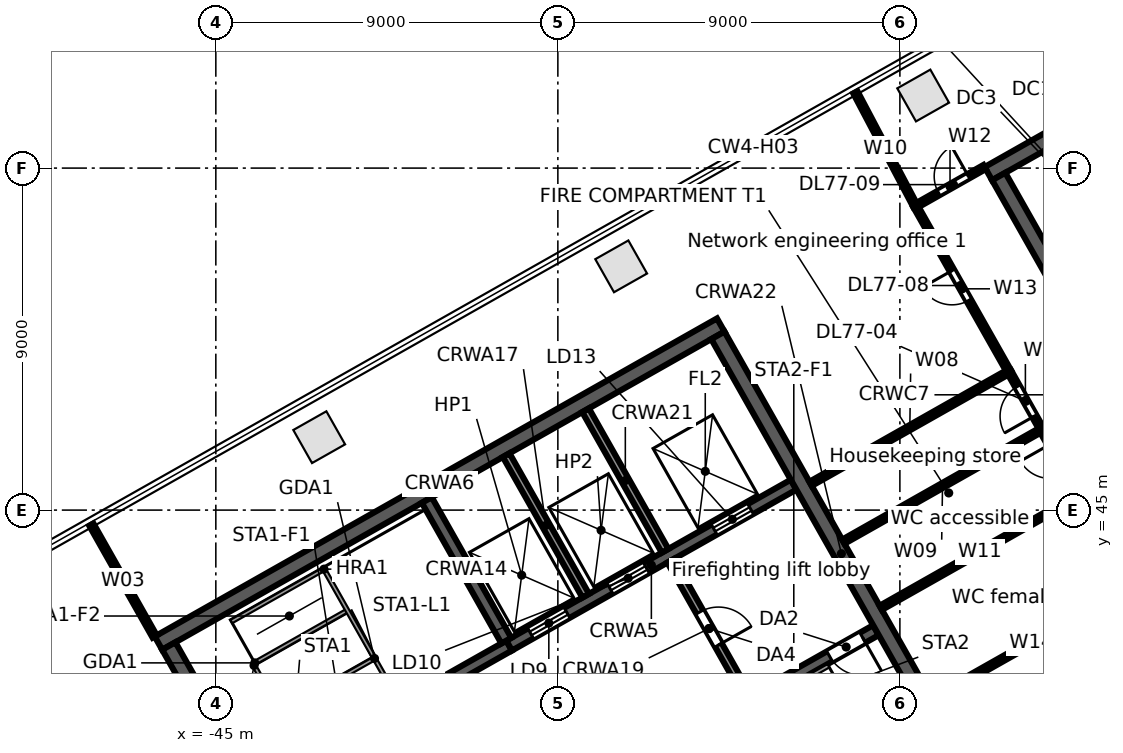
"""IFC4 building model, lengths in metres.
Left out: names, types, materials, properties, quantities, classifications, styles, units other than length and angle.
Written with IfcOpenShell. Run it as: python <this file> out.ifc"""

import sys

from ifc_helpers import new_model, si_unit, direction, frame, frame_2d, origin, origin_2d, place, context, subcontext, project, spatial, rectangle, extrude, element, fill, save


model = new_model("IFC4")
c1 = context("Model", 3, precision=1e-05, world=origin(), true_north=direction((0.0, 1.0)))
c2 = subcontext(c1, "Body", "Model", "MODEL_VIEW")
j1 = project(units=[si_unit("LENGTHUNIT", "METRE"), si_unit("PLANEANGLEUNIT", "RADIAN")], contexts=[c1])
p1 = place(None, origin())
s1 = spatial("IfcSite", under=j1, at=p1, CompositionType="ELEMENT")
p2 = place(p1, origin())
s2 = spatial("IfcBuilding", under=s1, at=p2, CompositionType="ELEMENT")
p3 = place(p2, frame((0.0, 0.0, 339.3)))
s3 = spatial("IfcBuildingStorey", under=s2, at=p3, CompositionType="ELEMENT", Elevation=339.3)
for number, where, z_axis, x_axis in (
    (1, (-26.388, 55.91, 0.0), (0.0, 0.0, 1.0), (-0.87, -0.492, 0.0)),
    (2, (-34.334, 51.414, 0.0), (0.0, 0.0, 1.0), (-0.87, -0.492, 0.0)),
    (3, (-42.28, 46.919, 0.0), (0.0, 0.0, 1.0), (-0.87, -0.492, 0.0)),
):
    element("IfcColumn", number, at=place(p3, frame(where, z_axis=z_axis, x_axis=x_axis)), inside=s3, PredefinedType="COLUMN", context=c2, shape_type="SweptSolid", body=[
        extrude(rectangle(XDim=1.0, YDim=1.0, at=origin_2d()), origin(), (0.0, 0.0, 1.0), 3.8),
    ])
p4 = place(p3, frame((-3.017, 46.293, 0.0), z_axis=(0.0, 0.0, 1.0), x_axis=(-0.870355474887, -0.492423950812, 0.0)))
e4 = element("IfcWall", 4, at=p4, inside=s3, PredefinedType="STANDARD", context=c2, shape_type="SweptSolid", body=[
    extrude(rectangle(XDim=40.34, YDim=0.25, at=frame_2d((20.17, 0.0))), origin(), (0.0, 0.0, 1.0), 3.52),
])
p5 = place(p4, frame((37.428, 0.0, 0.8)))
e5 = element("IfcOpeningElement", 5, at=p5, cuts=e4, PredefinedType="OPENING", context=c2, shape_type="SweptSolid", body=[
    extrude(rectangle(XDim=2.4, YDim=2.2, at=frame_2d((1.2, 1.1))), frame((0.0, 0.135, 0.0), z_axis=(0.0, -1.0, 0.0), x_axis=(1.0, 0.0, 0.0)), (0.0, 0.0, 1.0), 0.27),
])
p6 = place(p4, frame((34.372, 0.0, 0.0)))
e6 = element("IfcOpeningElement", 6, at=p6, cuts=e4, PredefinedType="OPENING", context=c2, shape_type="SweptSolid", body=[
    extrude(rectangle(XDim=1.8, YDim=2.4, at=frame_2d((0.9, 1.2))), frame((0.0, 0.135, 0.0), z_axis=(0.0, -1.0, 0.0), x_axis=(1.0, 0.0, 0.0)), (0.0, 0.0, 1.0), 0.27),
])
p7 = place(p4, frame((30.716, 0.0, 0.8)))
e7 = element("IfcOpeningElement", 7, at=p7, cuts=e4, PredefinedType="OPENING", context=c2, shape_type="SweptSolid", body=[
    extrude(rectangle(XDim=2.4, YDim=2.2, at=frame_2d((1.2, 1.1))), frame((0.0, 0.135, 0.0), z_axis=(0.0, -1.0, 0.0), x_axis=(1.0, 0.0, 0.0)), (0.0, 0.0, 1.0), 0.27),
])
p8 = place(p4, frame((27.36, 0.0, 0.8)))
e8 = element("IfcOpeningElement", 8, at=p8, cuts=e4, PredefinedType="OPENING", context=c2, shape_type="SweptSolid", body=[
    extrude(rectangle(XDim=2.4, YDim=2.2, at=frame_2d((1.2, 1.1))), frame((0.0, 0.135, 0.0), z_axis=(0.0, -1.0, 0.0), x_axis=(1.0, 0.0, 0.0)), (0.0, 0.0, 1.0), 0.27),
])
p9 = place(p4, frame((24.304, 0.0, 0.0)))
e9 = element("IfcOpeningElement", 9, at=p9, cuts=e4, PredefinedType="OPENING", context=c2, shape_type="SweptSolid", body=[
    extrude(rectangle(XDim=1.8, YDim=2.4, at=frame_2d((0.9, 1.2))), frame((0.0, 0.135, 0.0), z_axis=(0.0, -1.0, 0.0), x_axis=(1.0, 0.0, 0.0)), (0.0, 0.0, 1.0), 0.27),
])
p10 = place(p4, frame((20.648, 0.0, 0.8)))
e10 = element("IfcOpeningElement", 10, at=p10, cuts=e4, PredefinedType="OPENING", context=c2, shape_type="SweptSolid", body=[
    extrude(rectangle(XDim=2.4, YDim=2.2, at=frame_2d((1.2, 1.1))), frame((0.0, 0.135, 0.0), z_axis=(0.0, -1.0, 0.0), x_axis=(1.0, 0.0, 0.0)), (0.0, 0.0, 1.0), 0.27),
])
p11 = place(p4, frame((17.292, 0.0, 0.8)))
e11 = element("IfcOpeningElement", 11, at=p11, cuts=e4, PredefinedType="OPENING", context=c2, shape_type="SweptSolid", body=[
    extrude(rectangle(XDim=2.4, YDim=2.2, at=frame_2d((1.2, 1.1))), frame((0.0, 0.135, 0.0), z_axis=(0.0, -1.0, 0.0), x_axis=(1.0, 0.0, 0.0)), (0.0, 0.0, 1.0), 0.27),
])
p12 = place(p4, frame((14.236, 0.0, 0.0)))
e12 = element("IfcOpeningElement", 12, at=p12, cuts=e4, PredefinedType="OPENING", context=c2, shape_type="SweptSolid", body=[
    extrude(rectangle(XDim=1.8, YDim=2.4, at=frame_2d((0.9, 1.2))), frame((0.0, 0.135, 0.0), z_axis=(0.0, -1.0, 0.0), x_axis=(1.0, 0.0, 0.0)), (0.0, 0.0, 1.0), 0.27),
])
p13 = place(p4, frame((10.58, 0.0, 0.8)))
e13 = element("IfcOpeningElement", 13, at=p13, cuts=e4, PredefinedType="OPENING", context=c2, shape_type="SweptSolid", body=[
    extrude(rectangle(XDim=2.4, YDim=2.2, at=frame_2d((1.2, 1.1))), frame((0.0, 0.135, 0.0), z_axis=(0.0, -1.0, 0.0), x_axis=(1.0, 0.0, 0.0)), (0.0, 0.0, 1.0), 0.27),
])
p14 = place(p4, frame((7.224, 0.0, 0.8)))
e14 = element("IfcOpeningElement", 14, at=p14, cuts=e4, PredefinedType="OPENING", context=c2, shape_type="SweptSolid", body=[
    extrude(rectangle(XDim=2.4, YDim=2.2, at=frame_2d((1.2, 1.1))), frame((0.0, 0.135, 0.0), z_axis=(0.0, -1.0, 0.0), x_axis=(1.0, 0.0, 0.0)), (0.0, 0.0, 1.0), 0.27),
])
p15 = place(p4, frame((4.168, 0.0, 0.0)))
e15 = element("IfcOpeningElement", 15, at=p15, cuts=e4, PredefinedType="OPENING", context=c2, shape_type="SweptSolid", body=[
    extrude(rectangle(XDim=1.8, YDim=2.4, at=frame_2d((0.9, 1.2))), frame((0.0, 0.135, 0.0), z_axis=(0.0, -1.0, 0.0), x_axis=(1.0, 0.0, 0.0)), (0.0, 0.0, 1.0), 0.27),
])
p16 = place(p4, frame((0.512, 0.0, 0.8)))
e16 = element("IfcOpeningElement", 16, at=p16, cuts=e4, PredefinedType="OPENING", context=c2, shape_type="SweptSolid", body=[
    extrude(rectangle(XDim=2.4, YDim=2.2, at=frame_2d((1.2, 1.1))), frame((0.0, 0.135, 0.0), z_axis=(0.0, -1.0, 0.0), x_axis=(1.0, 0.0, 0.0)), (0.0, 0.0, 1.0), 0.27),
])
p17 = place(p3, frame((-34.245, 38.097, 0.0), z_axis=(0.0, 0.0, 1.0), x_axis=(0.870356351998, 0.492422400523, 0.0)))
e17 = element("IfcWall", 17, at=p17, inside=s3, PredefinedType="SOLIDWALL", context=c2, shape_type="SweptSolid", body=[
    extrude(rectangle(XDim=7.6, YDim=0.3, at=frame_2d((3.8, 0.0))), origin(), (0.0, 0.0, 1.0), 3.52),
])
p18 = place(p17, frame((6.2, 0.0, 0.0)))
e18 = element("IfcOpeningElement", 18, at=p18, cuts=e17, PredefinedType="OPENING", context=c2, shape_type="SweptSolid", body=[
    extrude(rectangle(XDim=1.0, YDim=2.1, at=frame_2d((0.5, 1.05))), frame((0.0, 0.16, 0.0), z_axis=(0.0, -1.0, 0.0), x_axis=(1.0, 0.0, 0.0)), (0.0, 0.0, 1.0), 0.32),
])
p19 = place(p3, frame((-43.897, 37.692, 0.0), z_axis=(0.0, 0.0, 1.0), x_axis=(0.870356351998, 0.492422400523, 0.0)))
e19 = element("IfcWall", 19, at=p19, inside=s3, PredefinedType="SOLIDWALL", context=c2, shape_type="SweptSolid", body=[
    extrude(rectangle(XDim=7.6, YDim=0.3, at=frame_2d((3.8, 0.0))), origin(), (0.0, 0.0, 1.0), 3.52),
])
p20 = place(p19, frame((0.4, 0.0, 0.0)))
e20 = element("IfcOpeningElement", 20, at=p20, cuts=e19, PredefinedType="OPENING", context=c2, shape_type="SweptSolid", body=[
    extrude(rectangle(XDim=1.0, YDim=2.1, at=frame_2d((0.5, 1.05))), frame((0.0, 0.16, 0.0), z_axis=(0.0, -1.0, 0.0), x_axis=(1.0, 0.0, 0.0)), (0.0, 0.0, 1.0), 0.32),
])
p21 = place(p3, frame((-37.282, 41.435, 0.0), z_axis=(0.0, 0.0, 1.0), x_axis=(0.870361315115, 0.492413628113, 0.0)))
e21 = element("IfcWall", 21, at=p21, inside=s3, PredefinedType="SOLIDWALL", context=c2, shape_type="SweptSolid", body=[
    extrude(rectangle(XDim=8.6, YDim=0.3, at=frame_2d((4.3, 0.0))), origin(), (0.0, 0.0, 1.0), 3.52),
])
p22 = place(p21, frame((0.65, 0.0, 0.0)))
e22 = element("IfcOpeningElement", 22, at=p22, cuts=e21, PredefinedType="OPENING", context=c2, shape_type="SweptSolid", body=[
    extrude(rectangle(XDim=1.1, YDim=2.1, at=frame_2d((0.55, 1.05))), frame((0.0, 0.16, 0.0), z_axis=(0.0, -1.0, 0.0), x_axis=(1.0, 0.0, 0.0)), (0.0, 0.0, 1.0), 0.32),
])
p23 = place(p21, frame((3.05, 0.0, 0.0)))
e23 = element("IfcOpeningElement", 23, at=p23, cuts=e21, PredefinedType="OPENING", context=c2, shape_type="SweptSolid", body=[
    extrude(rectangle(XDim=1.1, YDim=2.1, at=frame_2d((0.55, 1.05))), frame((0.0, 0.16, 0.0), z_axis=(0.0, -1.0, 0.0), x_axis=(1.0, 0.0, 0.0)), (0.0, 0.0, 1.0), 0.32),
])
p24 = place(p21, frame((6.2, 0.0, 0.0)))
e24 = element("IfcOpeningElement", 24, at=p24, cuts=e21, PredefinedType="OPENING", context=c2, shape_type="SweptSolid", body=[
    extrude(rectangle(XDim=1.1, YDim=2.1, at=frame_2d((0.55, 1.05))), frame((0.0, 0.16, 0.0), z_axis=(0.0, -1.0, 0.0), x_axis=(1.0, 0.0, 0.0)), (0.0, 0.0, 1.0), 0.32),
])
p25 = place(p3, frame((-46.51, 41.499, 0.0), z_axis=(0.0, 0.0, 1.0), x_axis=(0.870356271124, 0.492422543467, 0.0)))
e25 = element("IfcWall", 25, at=p25, inside=s3, PredefinedType="SOLIDWALL", context=c2, shape_type="SweptSolid", body=[
    extrude(rectangle(XDim=17.0, YDim=0.4, at=frame_2d((8.5, 0.0))), origin(), (0.0, 0.0, 1.0), 3.52),
])
p26 = place(p3, frame((-46.238, 41.423, 0.0), z_axis=(0.0, 0.0, 1.0), x_axis=(0.492421663121, -0.870356769198, 0.0)))
e26 = element("IfcWall", 26, at=p26, inside=s3, PredefinedType="SOLIDWALL", context=c2, shape_type="SweptSolid", body=[
    extrude(rectangle(XDim=13.2, YDim=0.4, at=frame_2d((6.6, 0.0))), origin(), (0.0, 0.0, 1.0), 3.52),
])
p27 = place(p3, frame((-39.449, 45.264, 0.0), z_axis=(0.0, 0.0, 1.0), x_axis=(0.492422543467, -0.870356271124, 0.0)))
e27 = element("IfcWall", 27, at=p27, inside=s3, PredefinedType="SOLIDWALL", context=c2, shape_type="SweptSolid", body=[
    extrude(rectangle(XDim=4.25, YDim=0.3, at=frame_2d((2.125, 0.0))), origin(), (0.0, 0.0, 1.0), 3.52),
])
p28 = place(p3, frame((-37.36, 46.446, 0.0), z_axis=(0.0, 0.0, 1.0), x_axis=(0.492422543467, -0.870356271124, 0.0)))
e28 = element("IfcWall", 28, at=p28, inside=s3, PredefinedType="SOLIDWALL", context=c2, shape_type="SweptSolid", body=[
    extrude(rectangle(XDim=4.25, YDim=0.2, at=frame_2d((2.125, 0.0))), origin(), (0.0, 0.0, 1.0), 3.52),
])
p29 = place(p3, frame((-33.031, 43.667, 0.0), z_axis=(0.0, 0.0, 1.0), x_axis=(0.492408451753, -0.87036424366, 0.0)))
e29 = element("IfcWall", 29, at=p29, inside=s3, PredefinedType="PARTITIONING", context=c2, shape_type="SweptSolid", body=[
    extrude(rectangle(XDim=4.1, YDim=0.2, at=frame_2d((2.05, 0.0))), origin(), (0.0, 0.0, 1.0), 3.52),
])
p30 = place(p29, frame((1.55, 0.0, 0.0)))
e30 = element("IfcOpeningElement", 30, at=p30, cuts=e29, PredefinedType="OPENING", context=c2, shape_type="SweptSolid", body=[
    extrude(rectangle(XDim=1.0, YDim=2.1, at=frame_2d((0.5, 1.05))), frame((0.0, 0.11, 0.0), z_axis=(0.0, -1.0, 0.0), x_axis=(1.0, 0.0, 0.0)), (0.0, 0.0, 1.0), 0.22),
])
p31 = place(p3, frame((-35.271, 47.628, 0.0), z_axis=(0.0, 0.0, 1.0), x_axis=(0.492422543467, -0.870356271124, 0.0)))
e31 = element("IfcWall", 31, at=p31, inside=s3, PredefinedType="SOLIDWALL", context=c2, shape_type="SweptSolid", body=[
    extrude(rectangle(XDim=4.25, YDim=0.2, at=frame_2d((2.125, 0.0))), origin(), (0.0, 0.0, 1.0), 3.52),
])
p32 = place(p3, frame((-31.79, 49.597, 0.0), z_axis=(0.0, 0.0, 1.0), x_axis=(0.492421663121, -0.870356769198, 0.0)))
e32 = element("IfcWall", 32, at=p32, inside=s3, PredefinedType="SOLIDWALL", context=c2, shape_type="SweptSolid", body=[
    extrude(rectangle(XDim=13.2, YDim=0.4, at=frame_2d((6.6, 0.0))), origin(), (0.0, 0.0, 1.0), 3.52),
])
p33 = place(p3, frame((-24.672, 53.854, 0.0), z_axis=(0.0, 0.0, 1.0), x_axis=(0.870353598469, 0.492427267353, 0.0)))
e33 = element("IfcWall", 33, at=p33, inside=s3, PredefinedType="SOLIDWALL", context=c2, shape_type="SweptSolid", body=[
    extrude(rectangle(XDim=15.0, YDim=0.4, at=frame_2d((7.5, 0.0))), origin(), (0.0, 0.0, 1.0), 3.52),
])
p34 = place(p3, frame((-24.4, 53.779, 0.0), z_axis=(0.0, 0.0, 1.0), x_axis=(0.492421663121, -0.870356769198, 0.0)))
e34 = element("IfcWall", 34, at=p34, inside=s3, PredefinedType="SOLIDWALL", context=c2, shape_type="SweptSolid", body=[
    extrude(rectangle(XDim=13.2, YDim=0.4, at=frame_2d((6.6, 0.0))), origin(), (0.0, 0.0, 1.0), 3.52),
])
p35 = place(p3, frame((-48.275, 44.618, 0.0), z_axis=(0.0, 0.0, 1.0), x_axis=(0.492404360331, -0.870366558369, 0.0)))
e35 = element("IfcWall", 35, at=p35, inside=s3, PredefinedType="PARTITIONING", context=c2, shape_type="SweptSolid", body=[
    extrude(rectangle(XDim=3.384, YDim=0.125, at=frame_2d((1.692, 0.0))), origin(), (0.0, 0.0, 1.0), 2.888),
])
p36 = place(p3, frame((-29.35, 45.692, 0.0), z_axis=(0.0, 0.0, 1.0), x_axis=(0.870318719588, 0.492488909859, 0.0)))
e36 = element("IfcWall", 36, at=p36, inside=s3, PredefinedType="PARTITIONING", context=c2, shape_type="SweptSolid", body=[
    extrude(rectangle(XDim=6.0, YDim=0.125, at=frame_2d((3.0, 0.0))), origin(), (0.0, 0.0, 1.0), 3.52),
])
p37 = place(p3, frame((-28.489, 44.169, 0.0), z_axis=(0.0, 0.0, 1.0), x_axis=(0.870308850352, 0.492506350211, 0.0)))
e37 = element("IfcWall", 37, at=p37, inside=s3, PredefinedType="PARTITIONING", context=c2, shape_type="SweptSolid", body=[
    extrude(rectangle(XDim=6.0, YDim=0.125, at=frame_2d((3.0, 0.0))), origin(), (0.0, 0.0, 1.0), 3.52),
])
p38 = place(p3, frame((-28.171, 55.993, 0.0), z_axis=(0.0, 0.0, 1.0), x_axis=(0.466919980712, -0.884299571193, 0.0)))
e38 = element("IfcWall", 38, at=p38, inside=s3, PredefinedType="PARTITIONING", context=c2, shape_type="SweptSolid", body=[
    extrude(rectangle(XDim=3.385, YDim=0.125, at=frame_2d((1.693, 0.0))), origin(), (0.0, 0.0, 1.0), 2.888),
])
p39 = place(p3, frame((-27.504, 42.428, 0.0), z_axis=(0.0, 0.0, 1.0), x_axis=(0.870308850352, 0.492506350211, 0.0)))
e39 = element("IfcWall", 39, at=p39, inside=s3, PredefinedType="PARTITIONING", context=c2, shape_type="SweptSolid", body=[
    extrude(rectangle(XDim=6.0, YDim=0.125, at=frame_2d((3.0, 0.0))), origin(), (0.0, 0.0, 1.0), 2.792),
])
p40 = place(p3, frame((-26.59, 52.999, 0.0), z_axis=(0.0, 0.0, 1.0), x_axis=(0.870384380082, 0.492372857609, 0.0)))
e40 = element("IfcWall", 40, at=p40, inside=s3, PredefinedType="PARTITIONING", context=c2, shape_type="SweptSolid", body=[
    extrude(rectangle(XDim=2.09, YDim=0.125, at=frame_2d((1.045, 0.0))), origin(), (0.0, 0.0, 1.0), 2.792),
])
p41 = place(p40, frame((0.7, 0.0, 0.0)))
e41 = element("IfcOpeningElement", 41, at=p41, cuts=e40, PredefinedType="OPENING", context=c2, shape_type="SweptSolid", body=[
    extrude(rectangle(XDim=0.9, YDim=2.1, at=frame_2d((0.45, 1.05))), frame((0.0, 0.073, 0.0), z_axis=(0.0, -1.0, 0.0), x_axis=(1.0, 0.0, 0.0)), (0.0, 0.0, 1.0), 0.145),
])
p42 = place(p3, frame((-26.59, 52.999, 0.0), z_axis=(0.0, 0.0, 1.0), x_axis=(0.492406341242, -0.870365437678, 0.0)))
e42 = element("IfcWall", 42, at=p42, inside=s3, PredefinedType="PARTITIONING", context=c2, shape_type="SweptSolid", body=[
    extrude(rectangle(XDim=5.0, YDim=0.125, at=frame_2d((2.5, 0.0))), origin(), (0.0, 0.0, 1.0), 3.52),
])
p43 = place(p42, frame((1.95, 0.0, 0.0)))
e43 = element("IfcOpeningElement", 43, at=p43, cuts=e42, PredefinedType="OPENING", context=c2, shape_type="SweptSolid", body=[
    extrude(rectangle(XDim=0.9, YDim=2.1, at=frame_2d((0.45, 1.05))), frame((0.0, 0.073, 0.0), z_axis=(0.0, -1.0, 0.0), x_axis=(1.0, 0.0, 0.0)), (0.0, 0.0, 1.0), 0.145),
])
p44 = place(p3, frame((-26.15, 40.035, 0.0), z_axis=(0.0, 0.0, 1.0), x_axis=(0.870418064747, 0.492313307317, 0.0)))
e44 = element("IfcWall", 44, at=p44, inside=s3, PredefinedType="PARTITIONING", context=c2, shape_type="SweptSolid", body=[
    extrude(rectangle(XDim=6.0, YDim=0.125, at=frame_2d((3.0, 0.0))), origin(), (0.0, 0.0, 1.0), 2.792),
])
p45 = place(p3, frame((-24.919, 37.859, 0.0), z_axis=(0.0, 0.0, 1.0), x_axis=(0.870308850352, 0.492506350211, 0.0)))
e45 = element("IfcWall", 45, at=p45, inside=s3, PredefinedType="PARTITIONING", context=c2, shape_type="SweptSolid", body=[
    extrude(rectangle(XDim=6.0, YDim=0.15, at=frame_2d((3.0, 0.0))), origin(), (0.0, 0.0, 1.0), 2.792),
])
p46 = place(p45, frame((2.45, 0.0, 0.0)))
e46 = element("IfcOpeningElement", 46, at=p46, cuts=e45, PredefinedType="OPENING", context=c2, shape_type="SweptSolid", body=[
    extrude(rectangle(XDim=0.9, YDim=2.1, at=frame_2d((0.45, 1.05))), frame((0.0, 0.085, 0.0), z_axis=(0.0, -1.0, 0.0), x_axis=(1.0, 0.0, 0.0)), (0.0, 0.0, 1.0), 0.17),
])
p47 = place(p3, frame((-24.128, 48.647, 0.0), z_axis=(0.0, 0.0, 1.0), x_axis=(0.492075650803, -0.870552441778, 0.0)))
e47 = element("IfcWall", 47, at=p47, inside=s3, PredefinedType="PARTITIONING", context=c2, shape_type="SweptSolid", body=[
    extrude(rectangle(XDim=1.75, YDim=0.125, at=frame_2d((0.875, 0.0))), origin(), (0.0, 0.0, 1.0), 3.52),
])
p48 = place(p47, frame((0.45, 0.0, 0.0)))
e48 = element("IfcOpeningElement", 48, at=p48, cuts=e47, PredefinedType="OPENING", context=c2, shape_type="SweptSolid", body=[
    extrude(rectangle(XDim=0.9, YDim=2.1, at=frame_2d((0.45, 1.05))), frame((0.0, 0.073, 0.0), z_axis=(0.0, -1.0, 0.0), x_axis=(1.0, 0.0, 0.0)), (0.0, 0.0, 1.0), 0.145),
])
p49 = place(p3, frame((-23.267, 47.124, 0.0), z_axis=(0.0, 0.0, 1.0), x_axis=(0.492467412326, -0.870330884088, 0.0)))
e49 = element("IfcWall", 49, at=p49, inside=s3, PredefinedType="PARTITIONING", context=c2, shape_type="SweptSolid", body=[
    extrude(rectangle(XDim=2.0, YDim=0.15, at=frame_2d((1.0, 0.0))), origin(), (0.0, 0.0, 1.0), 2.792),
])
p50 = place(p49, frame((0.45, 0.0, 0.0)))
e50 = element("IfcOpeningElement", 50, at=p50, cuts=e49, PredefinedType="OPENING", context=c2, shape_type="SweptSolid", body=[
    extrude(rectangle(XDim=0.9, YDim=2.1, at=frame_2d((0.45, 1.05))), frame((0.0, 0.085, 0.0), z_axis=(0.0, -1.0, 0.0), x_axis=(1.0, 0.0, 0.0)), (0.0, 0.0, 1.0), 0.17),
])
p51 = place(p22, origin())
e51 = element("IfcDoor", 51, at=p51, inside=s3, OperationType="DOUBLE_DOOR_SLIDING", PredefinedType="DOOR", context=c2, shape_type="SweptSolid", body=[
    extrude(rectangle(XDim=1.1, YDim=2.1, at=frame_2d((0.55, 1.05))), frame((0.0, 0.025, 0.0), z_axis=(0.0, -1.0, 0.0), x_axis=(1.0, 0.0, 0.0)), (0.0, 0.0, 1.0), 0.05),
])
fill(e22, e51)
p52 = place(p23, origin())
e52 = element("IfcDoor", 52, at=p52, inside=s3, OperationType="DOUBLE_DOOR_SLIDING", PredefinedType="DOOR", context=c2, shape_type="SweptSolid", body=[
    extrude(rectangle(XDim=1.1, YDim=2.1, at=frame_2d((0.55, 1.05))), frame((0.0, 0.025, 0.0), z_axis=(0.0, -1.0, 0.0), x_axis=(1.0, 0.0, 0.0)), (0.0, 0.0, 1.0), 0.05),
])
fill(e23, e52)
p53 = place(p24, origin())
e53 = element("IfcDoor", 53, at=p53, inside=s3, OperationType="DOUBLE_DOOR_SLIDING", PredefinedType="DOOR", context=c2, shape_type="SweptSolid", body=[
    extrude(rectangle(XDim=1.1, YDim=2.1, at=frame_2d((0.55, 1.05))), frame((0.0, 0.025, 0.0), z_axis=(0.0, -1.0, 0.0), x_axis=(1.0, 0.0, 0.0)), (0.0, 0.0, 1.0), 0.05),
])
fill(e24, e53)
p54 = place(p18, frame((1.0, 0.0, 0.0), z_axis=(0.0, 0.0, 1.0), x_axis=(-1.0, 0.0, 0.0)))
e54 = element("IfcDoor", 54, at=p54, inside=s3, OperationType="SINGLE_SWING_LEFT", PredefinedType="DOOR", context=c2, shape_type="SweptSolid", body=[
    extrude(rectangle(XDim=1.0, YDim=2.1, at=frame_2d((0.5, 1.05))), frame((0.0, 0.025, 0.0), z_axis=(0.0, -1.0, 0.0), x_axis=(1.0, 0.0, 0.0)), (0.0, 0.0, 1.0), 0.05),
])
fill(e18, e54)
p55 = place(p30, origin())
e55 = element("IfcDoor", 55, at=p55, inside=s3, OperationType="SINGLE_SWING_RIGHT", PredefinedType="DOOR", context=c2, shape_type="SweptSolid", body=[
    extrude(rectangle(XDim=1.0, YDim=2.1, at=frame_2d((0.5, 1.05))), frame((0.0, 0.025, 0.0), z_axis=(0.0, -1.0, 0.0), x_axis=(1.0, 0.0, 0.0)), (0.0, 0.0, 1.0), 0.05),
])
fill(e30, e55)
p56 = place(p48, frame((0.9, 0.0, 0.0), z_axis=(0.0, 0.0, 1.0), x_axis=(-1.0, 0.0, 0.0)))
e56 = element("IfcDoor", 56, at=p56, inside=s3, OperationType="SINGLE_SWING_LEFT", PredefinedType="DOOR", context=c2, shape_type="SweptSolid", body=[
    extrude(rectangle(XDim=0.9, YDim=2.1, at=frame_2d((0.45, 1.05))), frame((0.0, 0.025, 0.0), z_axis=(0.0, -1.0, 0.0), x_axis=(1.0, 0.0, 0.0)), (0.0, 0.0, 1.0), 0.05),
])
fill(e48, e56)
p57 = place(p43, frame((0.9, 0.0, 0.0), z_axis=(0.0, 0.0, 1.0), x_axis=(-1.0, 0.0, 0.0)))
e57 = element("IfcDoor", 57, at=p57, inside=s3, OperationType="SINGLE_SWING_RIGHT", PredefinedType="DOOR", context=c2, shape_type="SweptSolid", body=[
    extrude(rectangle(XDim=0.9, YDim=2.1, at=frame_2d((0.45, 1.05))), frame((0.0, 0.025, 0.0), z_axis=(0.0, -1.0, 0.0), x_axis=(1.0, 0.0, 0.0)), (0.0, 0.0, 1.0), 0.05),
])
fill(e43, e57)
p58 = place(p41, origin())
e58 = element("IfcDoor", 58, at=p58, inside=s3, OperationType="SINGLE_SWING_RIGHT", PredefinedType="DOOR", context=c2, shape_type="SweptSolid", body=[
    extrude(rectangle(XDim=0.9, YDim=2.1, at=frame_2d((0.45, 1.05))), frame((0.0, 0.025, 0.0), z_axis=(0.0, -1.0, 0.0), x_axis=(1.0, 0.0, 0.0)), (0.0, 0.0, 1.0), 0.05),
])
fill(e41, e58)
save(model, sys.argv[1])
